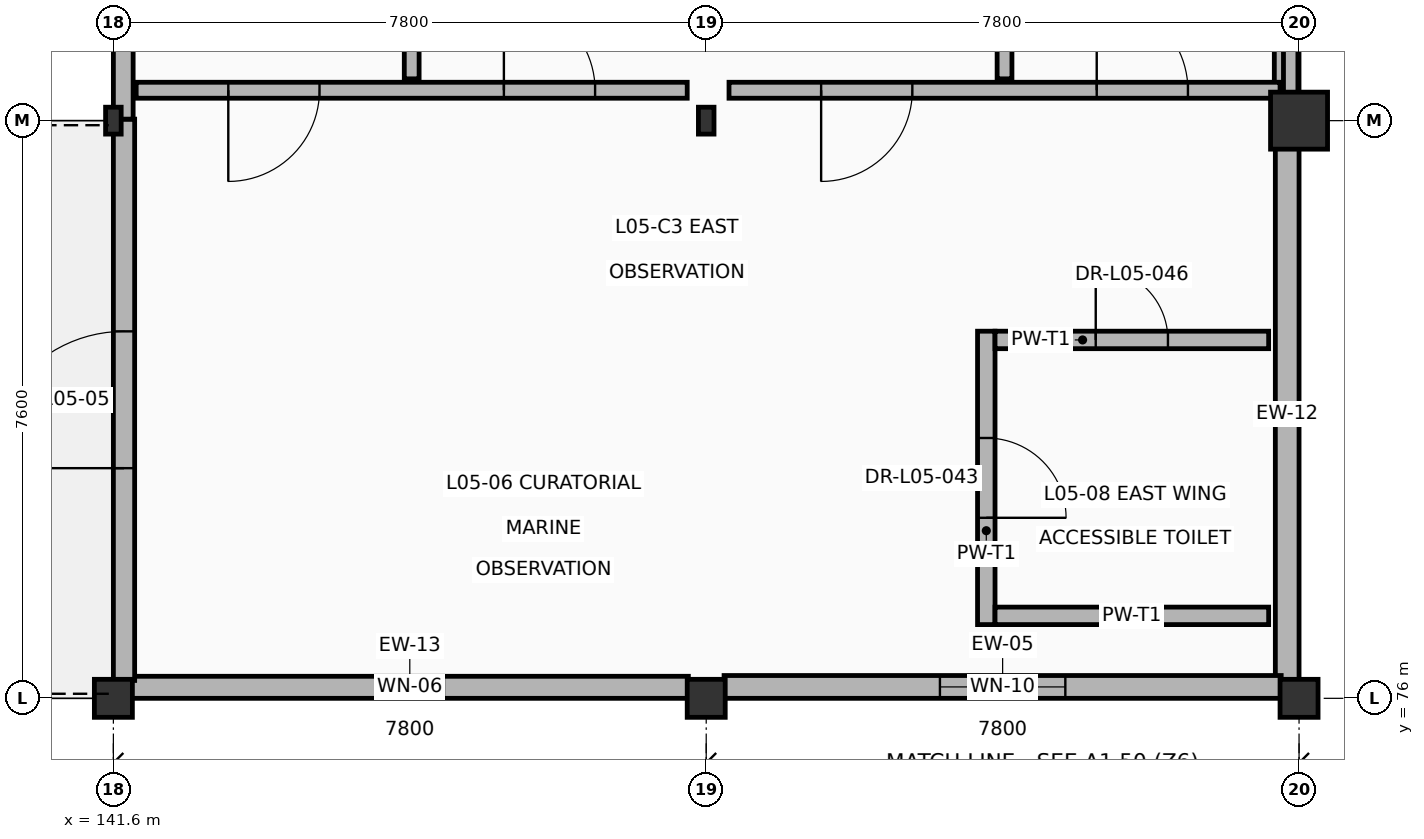
"""IFC4 building model, lengths in metres.
Left out: names, types, materials, properties, quantities, classifications, styles, units other than length and angle.
Written with IfcOpenShell. Run it as: python <this file> out.ifc"""

import sys

from ifc_helpers import new_model, si_unit, direction, frame, frame_2d, origin, origin_2d, place, context, subcontext, project, spatial, rectangle, circle, i_section, extrude, element, fill, save


model = new_model("IFC4")
c1 = context("Model", 3, precision=1e-05, world=origin(), true_north=direction((0.0, 1.0)))
c2 = subcontext(c1, "Body", "Model", "MODEL_VIEW")
j1 = project(units=[si_unit("LENGTHUNIT", "METRE"), si_unit("PLANEANGLEUNIT", "RADIAN")], contexts=[c1])
p1 = place(None, origin())
s1 = spatial("IfcSite", under=j1, at=p1, CompositionType="ELEMENT")
p2 = place(p1, origin())
s2 = spatial("IfcBuilding", under=s1, at=p2, CompositionType="ELEMENT")
p3 = place(p2, frame((0.0, 0.0, 19.8)))
s3 = spatial("IfcBuildingStorey", under=s2, at=p3, CompositionType="ELEMENT", Elevation=19.8)
p4 = place(p3, frame((141.6, 76.0, 0.0), z_axis=(0.0, 0.0, 1.0), x_axis=(1.0, 0.0, 0.0)))
e1 = element("IfcColumn", 1, at=p4, inside=s3, PredefinedType="COLUMN", context=c2, shape_type="SweptSolid", body=[
    extrude(rectangle(XDim=0.5, YDim=0.5, at=origin_2d()), origin(), (0.0, 0.0, 1.0), 4.2),
])
p5 = place(p3, frame((141.6, 83.6, 0.0), z_axis=(0.0, 0.0, 1.0), x_axis=(1.0, 0.0, 0.0)))
e2 = element("IfcColumn", 2, at=p5, inside=s3, PredefinedType="COLUMN", context=c2, shape_type="SweptSolid", body=[
    extrude(i_section(OverallWidth=0.205, OverallDepth=0.354, WebThickness=0.01, FlangeThickness=0.017, at=origin_2d()), origin(), (0.0, 0.0, 1.0), 4.2),
])
p6 = place(p3, frame((149.4, 76.0, 0.0), z_axis=(0.0, 0.0, 1.0), x_axis=(1.0, 0.0, 0.0)))
e3 = element("IfcColumn", 3, at=p6, inside=s3, PredefinedType="COLUMN", context=c2, shape_type="SweptSolid", body=[
    extrude(rectangle(XDim=0.5, YDim=0.5, at=origin_2d()), origin(), (0.0, 0.0, 1.0), 4.2),
])
p7 = place(p3, frame((149.4, 83.6, 0.0), z_axis=(0.0, 0.0, 1.0), x_axis=(1.0, 0.0, 0.0)))
e4 = element("IfcColumn", 4, at=p7, inside=s3, PredefinedType="COLUMN", context=c2, shape_type="SweptSolid", body=[
    extrude(i_section(OverallWidth=0.205, OverallDepth=0.354, WebThickness=0.01, FlangeThickness=0.017, at=origin_2d()), origin(), (0.0, 0.0, 1.0), 4.2),
])
p8 = place(p3, frame((157.2, 76.0, 0.0), z_axis=(0.0, 0.0, 1.0), x_axis=(1.0, 0.0, 0.0)))
e5 = element("IfcColumn", 5, at=p8, inside=s3, PredefinedType="COLUMN", context=c2, shape_type="SweptSolid", body=[
    extrude(rectangle(XDim=0.5, YDim=0.5, at=origin_2d()), origin(), (0.0, 0.0, 1.0), 4.2),
])
p9 = place(p3, frame((157.2, 83.6, 0.0), z_axis=(0.0, 0.0, 1.0), x_axis=(1.0, 0.0, 0.0)))
e6 = element("IfcColumn", 6, at=p9, inside=s3, PredefinedType="COLUMN", context=c2, shape_type="SweptSolid", body=[
    extrude(circle(Radius=0.375, at=origin_2d()), origin(), (0.0, 0.0, 1.0), 4.2),
])
p10 = place(p3, frame((157.037, 88.32, 0.0), z_axis=(0.0, 0.0, 1.0), x_axis=(0.0, -1.0, 0.0)))
e7 = element("IfcWall", 7, at=p10, inside=s3, PredefinedType="SOLIDWALL", context=c2, shape_type="SweptSolid", body=[
    extrude(rectangle(XDim=4.36, YDim=0.325, at=frame_2d((2.18, 0.0))), origin(), (0.0, 0.0, 1.0), 3.96),
])
p11 = place(p3, frame((157.044, 83.24, 0.0), z_axis=(0.0, 0.0, 1.0), x_axis=(0.0, -1.0, 0.0)))
e8 = element("IfcWall", 8, at=p11, inside=s3, PredefinedType="SOLIDWALL", context=c2, shape_type="SweptSolid", body=[
    extrude(rectangle(XDim=7.005, YDim=0.312, at=frame_2d((3.502, 0.0))), origin(), (0.0, 0.0, 1.0), 3.96),
])
p12 = place(p3, frame((156.965, 76.15, 0.0), z_axis=(0.0, 0.0, 1.0), x_axis=(-1.0, 0.0, 0.0)))
e9 = element("IfcWall", 9, at=p12, inside=s3, PredefinedType="SOLIDWALL", context=c2, shape_type="SweptSolid", body=[
    extrude(rectangle(XDim=7.33, YDim=0.3, at=frame_2d((3.665, 0.0))), origin(), (0.0, 0.0, 1.0), 3.295),
])
p13 = place(p12, frame((2.84, 0.0, 0.95)))
e10 = element("IfcOpeningElement", 10, at=p13, cuts=e9, PredefinedType="OPENING", context=c2, shape_type="SweptSolid", body=[
    extrude(rectangle(XDim=1.65, YDim=1.95, at=frame_2d((0.825, 0.975))), frame((0.0, 0.16, 0.0), z_axis=(0.0, -1.0, 0.0), x_axis=(1.0, 0.0, 0.0)), (0.0, 0.0, 1.0), 0.32),
])
p14 = place(p3, frame((149.165, 76.145, 0.0), z_axis=(0.0, 0.0, 1.0), x_axis=(-1.0, 0.0, 0.0)))
e11 = element("IfcWall", 11, at=p14, inside=s3, PredefinedType="SOLIDWALL", context=c2, shape_type="SweptSolid", body=[
    extrude(rectangle(XDim=7.33, YDim=0.29, at=frame_2d((3.665, 0.0))), origin(), (0.0, 0.0, 1.0), 3.295),
])
p15 = place(p14, frame((3.215, 0.0, 0.95)))
e12 = element("IfcOpeningElement", 12, at=p15, cuts=e11, PredefinedType="OPENING", context=c2, shape_type="SweptSolid", body=[
    extrude(rectangle(XDim=0.9, YDim=1.6, at=frame_2d((0.45, 0.8))), frame((0.0, 0.155, 0.0), z_axis=(0.0, -1.0, 0.0), x_axis=(1.0, 0.0, 0.0)), (0.0, 0.0, 1.0), 0.31),
])
p16 = place(p3, frame((141.74, 76.235, 0.0), z_axis=(0.0, 0.0, 1.0), x_axis=(0.0, 1.0, 0.0)))
e13 = element("IfcWall", 13, at=p16, inside=s3, PredefinedType="SOLIDWALL", context=c2, shape_type="SweptSolid", body=[
    extrude(rectangle(XDim=7.385, YDim=0.28, at=frame_2d((3.692, 0.0))), origin(), (0.0, 0.0, 1.0), 3.96),
])
p17 = place(p16, frame((2.793, 0.0, 0.0)))
e14 = element("IfcOpeningElement", 14, at=p17, cuts=e13, PredefinedType="OPENING", context=c2, shape_type="SweptSolid", body=[
    extrude(rectangle(XDim=1.8, YDim=2.3, at=frame_2d((0.9, 1.15))), frame((0.0, 0.15, 0.0), z_axis=(0.0, -1.0, 0.0), x_axis=(1.0, 0.0, 0.0)), (0.0, 0.0, 1.0), 0.3),
])
p18 = place(p3, frame((141.73, 83.62, 0.0), z_axis=(0.0, 0.0, 1.0), x_axis=(0.0, 1.0, 0.0)))
e15 = element("IfcWall", 15, at=p18, inside=s3, PredefinedType="SOLIDWALL", context=c2, shape_type="SweptSolid", body=[
    extrude(rectangle(XDim=4.76, YDim=0.26, at=frame_2d((2.38, 0.0))), origin(), (0.0, 0.0, 1.0), 3.96),
])
p19 = place(p3, frame((157.09, 83.95, 4.2), z_axis=(0.0, 0.0, 1.0), x_axis=(0.0, 1.0, 0.0)))
e16 = element("IfcWall", 16, at=p19, inside=s3, PredefinedType="PARAPET", context=c2, shape_type="SweptSolid", body=[
    extrude(rectangle(XDim=14.1, YDim=0.19, at=frame_2d((7.05, 0.0))), origin(), (0.0, 0.0, 1.0), 1.15),
])
p20 = place(p3, frame((141.9, 84.0, 0.0), z_axis=(0.0, 0.0, 1.0), x_axis=(1.0, 0.0, 0.0)))
e17 = element("IfcWall", 17, at=p20, inside=s3, PredefinedType="PARTITIONING", context=c2, shape_type="SweptSolid", body=[
    extrude(rectangle(XDim=7.25, YDim=0.21, at=frame_2d((3.625, 0.0))), origin(), (0.0, 0.0, 1.0), 3.335),
])
p21 = place(p20, frame((1.212, 0.0, 0.0)))
e18 = element("IfcOpeningElement", 18, at=p21, cuts=e17, PredefinedType="OPENING", context=c2, shape_type="SweptSolid", body=[
    extrude(rectangle(XDim=1.2, YDim=2.2, at=frame_2d((0.6, 1.1))), frame((0.0, 0.115, 0.0), z_axis=(0.0, -1.0, 0.0), x_axis=(1.0, 0.0, 0.0)), (0.0, 0.0, 1.0), 0.23),
])
p22 = place(p20, frame((4.838, 0.0, 0.0)))
e19 = element("IfcOpeningElement", 19, at=p22, cuts=e17, PredefinedType="OPENING", context=c2, shape_type="SweptSolid", body=[
    extrude(rectangle(XDim=1.2, YDim=2.2, at=frame_2d((0.6, 1.1))), frame((0.0, 0.115, 0.0), z_axis=(0.0, -1.0, 0.0), x_axis=(1.0, 0.0, 0.0)), (0.0, 0.0, 1.0), 0.23),
])
p23 = place(p3, frame((145.525, 84.15, 0.0), z_axis=(0.0, 0.0, 1.0), x_axis=(0.0, 1.0, 0.0)))
e20 = element("IfcWall", 20, at=p23, inside=s3, PredefinedType="PARTITIONING", context=c2, shape_type="SweptSolid", body=[
    extrude(rectangle(XDim=4.1, YDim=0.195, at=frame_2d((2.05, 0.0))), origin(), (0.0, 0.0, 1.0), 3.335),
])
p24 = place(p23, frame((1.5, 0.0, 0.0)))
e21 = element("IfcOpeningElement", 21, at=p24, cuts=e20, PredefinedType="OPENING", context=c2, shape_type="SweptSolid", body=[
    extrude(rectangle(XDim=1.1, YDim=2.15, at=frame_2d((0.55, 1.075))), frame((0.0, 0.107, 0.0), z_axis=(0.0, -1.0, 0.0), x_axis=(1.0, 0.0, 0.0)), (0.0, 0.0, 1.0), 0.215),
])
p25 = place(p3, frame((149.7, 84.0, 0.0), z_axis=(0.0, 0.0, 1.0), x_axis=(1.0, 0.0, 0.0)))
e22 = element("IfcWall", 22, at=p25, inside=s3, PredefinedType="PARTITIONING", context=c2, shape_type="SweptSolid", body=[
    extrude(rectangle(XDim=7.25, YDim=0.21, at=frame_2d((3.625, 0.0))), origin(), (0.0, 0.0, 1.0), 3.335),
])
p26 = place(p25, frame((1.212, 0.0, 0.0)))
e23 = element("IfcOpeningElement", 23, at=p26, cuts=e22, PredefinedType="OPENING", context=c2, shape_type="SweptSolid", body=[
    extrude(rectangle(XDim=1.2, YDim=2.2, at=frame_2d((0.6, 1.1))), frame((0.0, 0.115, 0.0), z_axis=(0.0, -1.0, 0.0), x_axis=(1.0, 0.0, 0.0)), (0.0, 0.0, 1.0), 0.23),
])
p27 = place(p25, frame((4.838, 0.0, 0.0)))
e24 = element("IfcOpeningElement", 24, at=p27, cuts=e22, PredefinedType="OPENING", context=c2, shape_type="SweptSolid", body=[
    extrude(rectangle(XDim=1.2, YDim=2.2, at=frame_2d((0.6, 1.1))), frame((0.0, 0.115, 0.0), z_axis=(0.0, -1.0, 0.0), x_axis=(1.0, 0.0, 0.0)), (0.0, 0.0, 1.0), 0.23),
])
p28 = place(p3, frame((153.325, 84.15, 0.0), z_axis=(0.0, 0.0, 1.0), x_axis=(0.0, 1.0, 0.0)))
e25 = element("IfcWall", 25, at=p28, inside=s3, PredefinedType="PARTITIONING", context=c2, shape_type="SweptSolid", body=[
    extrude(rectangle(XDim=4.1, YDim=0.195, at=frame_2d((2.05, 0.0))), origin(), (0.0, 0.0, 1.0), 3.335),
])
p29 = place(p28, frame((1.5, 0.0, 0.0)))
e26 = element("IfcOpeningElement", 26, at=p29, cuts=e25, PredefinedType="OPENING", context=c2, shape_type="SweptSolid", body=[
    extrude(rectangle(XDim=1.1, YDim=2.15, at=frame_2d((0.55, 1.075))), frame((0.0, 0.107, 0.0), z_axis=(0.0, -1.0, 0.0), x_axis=(1.0, 0.0, 0.0)), (0.0, 0.0, 1.0), 0.215),
])
p30 = place(p3, frame((153.085, 76.97, 0.0), z_axis=(0.0, 0.0, 1.0), x_axis=(0.0, 1.0, 0.0)))
e27 = element("IfcWall", 27, at=p30, inside=s3, PredefinedType="PLUMBINGWALL", context=c2, shape_type="SweptSolid", body=[
    extrude(rectangle(XDim=3.86, YDim=0.23, at=frame_2d((1.93, 0.0))), origin(), (0.0, 0.0, 1.0), 3.335),
])
p31 = place(p30, frame((1.405, 0.0, 0.0)))
e28 = element("IfcOpeningElement", 28, at=p31, cuts=e27, PredefinedType="OPENING", context=c2, shape_type="SweptSolid", body=[
    extrude(rectangle(XDim=1.05, YDim=2.1, at=frame_2d((0.525, 1.05))), frame((0.0, 0.125, 0.0), z_axis=(0.0, -1.0, 0.0), x_axis=(1.0, 0.0, 0.0)), (0.0, 0.0, 1.0), 0.25),
])
p32 = place(p3, frame((153.2, 77.085, 0.0), z_axis=(0.0, 0.0, 1.0), x_axis=(1.0, 0.0, 0.0)))
e29 = element("IfcWall", 29, at=p32, inside=s3, PredefinedType="PLUMBINGWALL", context=c2, shape_type="SweptSolid", body=[
    extrude(rectangle(XDim=3.6, YDim=0.23, at=frame_2d((1.8, 0.0))), origin(), (0.0, 0.0, 1.0), 3.335),
])
p33 = place(p3, frame((153.2, 80.715, 0.0), z_axis=(0.0, 0.0, 1.0), x_axis=(1.0, 0.0, 0.0)))
e30 = element("IfcWall", 30, at=p33, inside=s3, PredefinedType="PLUMBINGWALL", context=c2, shape_type="SweptSolid", body=[
    extrude(rectangle(XDim=3.6, YDim=0.23, at=frame_2d((1.8, 0.0))), origin(), (0.0, 0.0, 1.0), 3.335),
])
p34 = place(p33, frame((1.325, 0.0, 0.0)))
e31 = element("IfcOpeningElement", 31, at=p34, cuts=e30, PredefinedType="OPENING", context=c2, shape_type="SweptSolid", body=[
    extrude(rectangle(XDim=0.95, YDim=2.1, at=frame_2d((0.475, 1.05))), frame((0.0, 0.125, 0.0), z_axis=(0.0, -1.0, 0.0), x_axis=(1.0, 0.0, 0.0)), (0.0, 0.0, 1.0), 0.25),
])
p35 = place(p17, origin())
e32 = element("IfcDoor", 32, at=p35, inside=s3, OperationType="DOUBLE_DOOR_SINGLE_SWING", PredefinedType="DOOR", context=c2, shape_type="SweptSolid", body=[
    extrude(rectangle(XDim=1.8, YDim=2.3, at=frame_2d((0.9, 1.15))), frame((0.0, 0.025, 0.0), z_axis=(0.0, -1.0, 0.0), x_axis=(1.0, 0.0, 0.0)), (0.0, 0.0, 1.0), 0.05),
])
fill(e14, e32)
p36 = place(p13, origin())
e33 = element("IfcWindow", 33, at=p36, inside=s3, PartitioningType="SINGLE_PANEL", PredefinedType="WINDOW", context=c2, shape_type="SweptSolid", body=[
    extrude(rectangle(XDim=1.65, YDim=1.95, at=frame_2d((0.825, 0.975))), frame((0.0, 0.03, 0.0), z_axis=(0.0, -1.0, 0.0), x_axis=(1.0, 0.0, 0.0)), (0.0, 0.0, 1.0), 0.06),
])
fill(e10, e33)
p37 = place(p15, origin())
e34 = element("IfcWindow", 34, at=p37, inside=s3, PartitioningType="SINGLE_PANEL", PredefinedType="WINDOW", context=c2, shape_type="SweptSolid", body=[
    extrude(rectangle(XDim=0.9, YDim=1.6, at=frame_2d((0.45, 0.8))), frame((0.0, 0.03, 0.0), z_axis=(0.0, -1.0, 0.0), x_axis=(1.0, 0.0, 0.0)), (0.0, 0.0, 1.0), 0.06),
])
fill(e12, e34)
p38 = place(p21, origin())
e35 = element("IfcDoor", 35, at=p38, inside=s3, OperationType="SINGLE_SWING_RIGHT", PredefinedType="DOOR", context=c2, shape_type="SweptSolid", body=[
    extrude(rectangle(XDim=1.2, YDim=2.2, at=frame_2d((0.6, 1.1))), frame((0.0, 0.025, 0.0), z_axis=(0.0, -1.0, 0.0), x_axis=(1.0, 0.0, 0.0)), (0.0, 0.0, 1.0), 0.05),
])
fill(e18, e35)
p39 = place(p22, origin())
e36 = element("IfcDoor", 36, at=p39, inside=s3, OperationType="SINGLE_SWING_LEFT", PredefinedType="DOOR", context=c2, shape_type="SweptSolid", body=[
    extrude(rectangle(XDim=1.2, YDim=2.2, at=frame_2d((0.6, 1.1))), frame((0.0, 0.025, 0.0), z_axis=(0.0, -1.0, 0.0), x_axis=(1.0, 0.0, 0.0)), (0.0, 0.0, 1.0), 0.05),
])
fill(e19, e36)
p40 = place(p26, origin())
e37 = element("IfcDoor", 37, at=p40, inside=s3, OperationType="SINGLE_SWING_RIGHT", PredefinedType="DOOR", context=c2, shape_type="SweptSolid", body=[
    extrude(rectangle(XDim=1.2, YDim=2.2, at=frame_2d((0.6, 1.1))), frame((0.0, 0.025, 0.0), z_axis=(0.0, -1.0, 0.0), x_axis=(1.0, 0.0, 0.0)), (0.0, 0.0, 1.0), 0.05),
])
fill(e23, e37)
p41 = place(p27, origin())
e38 = element("IfcDoor", 38, at=p41, inside=s3, OperationType="SINGLE_SWING_LEFT", PredefinedType="DOOR", context=c2, shape_type="SweptSolid", body=[
    extrude(rectangle(XDim=1.2, YDim=2.2, at=frame_2d((0.6, 1.1))), frame((0.0, 0.025, 0.0), z_axis=(0.0, -1.0, 0.0), x_axis=(1.0, 0.0, 0.0)), (0.0, 0.0, 1.0), 0.05),
])
fill(e24, e38)
p42 = place(p31, origin())
e39 = element("IfcDoor", 39, at=p42, inside=s3, OperationType="SINGLE_SWING_RIGHT", PredefinedType="DOOR", context=c2, shape_type="SweptSolid", body=[
    extrude(rectangle(XDim=1.05, YDim=2.1, at=frame_2d((0.525, 1.05))), frame((0.0, 0.025, 0.0), z_axis=(0.0, -1.0, 0.0), x_axis=(1.0, 0.0, 0.0)), (0.0, 0.0, 1.0), 0.05),
])
fill(e28, e39)
p43 = place(p34, origin())
e40 = element("IfcDoor", 40, at=p43, inside=s3, OperationType="SINGLE_SWING_LEFT", PredefinedType="DOOR", context=c2, shape_type="SweptSolid", body=[
    extrude(rectangle(XDim=0.95, YDim=2.1, at=frame_2d((0.475, 1.05))), frame((0.0, 0.025, 0.0), z_axis=(0.0, -1.0, 0.0), x_axis=(1.0, 0.0, 0.0)), (0.0, 0.0, 1.0), 0.05),
])
fill(e31, e40)
save(model, sys.argv[1])
